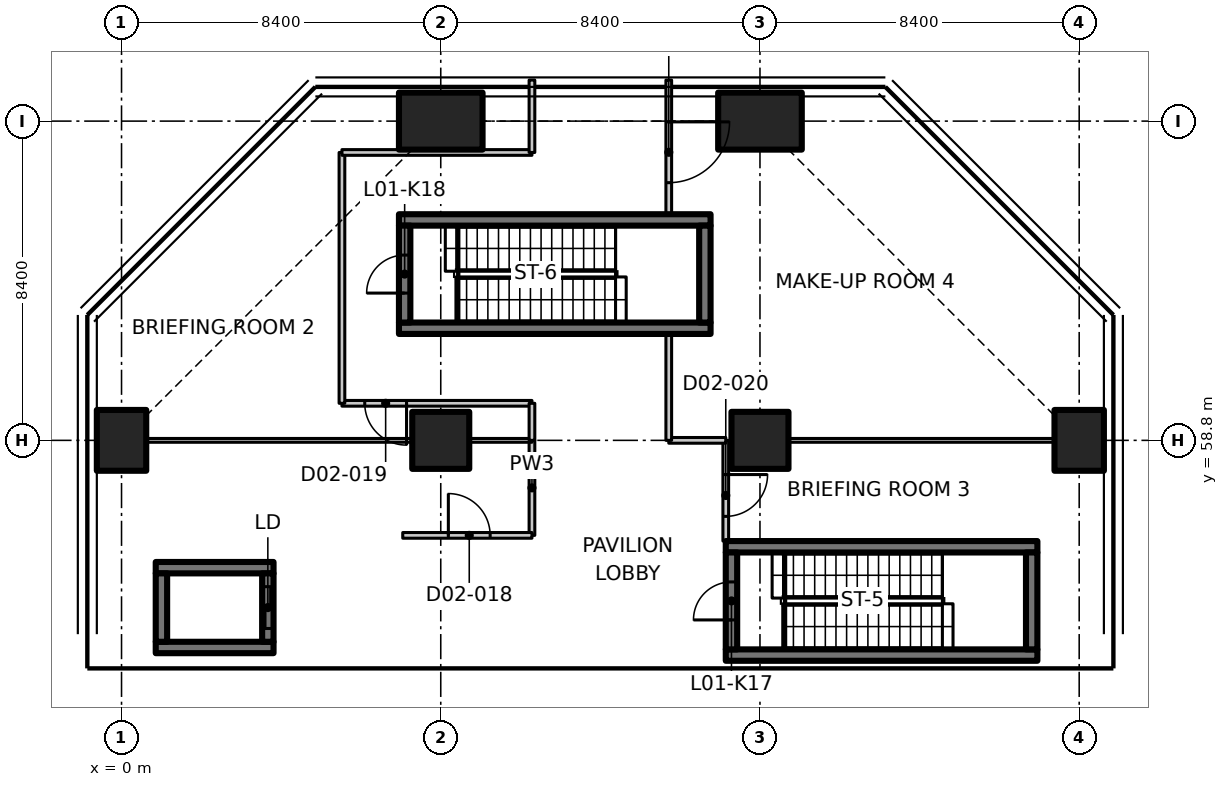
"""IFC4 building model, lengths in metres.
Left out: names, types, materials, properties, quantities, classifications, styles, units other than length and angle.
Written with IfcOpenShell. Run it as: python <this file> out.ifc"""

import sys

from ifc_helpers import new_model, si_unit, direction, frame, frame_2d, origin, origin_2d, place, context, subcontext, project, spatial, polyline, rectangle, outline, extrude, element, fill, save


model = new_model("IFC4")
c1 = context("Model", 3, precision=1e-05, world=origin(), true_north=direction((0.0, 1.0)))
c2 = subcontext(c1, "Body", "Model", "MODEL_VIEW")
j1 = project(units=[si_unit("LENGTHUNIT", "METRE"), si_unit("PLANEANGLEUNIT", "RADIAN")], contexts=[c1])
p1 = place(None, origin())
s1 = spatial("IfcSite", under=j1, at=p1, CompositionType="ELEMENT")
p2 = place(p1, origin())
s2 = spatial("IfcBuilding", under=s1, at=p2, CompositionType="ELEMENT")
p3 = place(p2, frame((0.0, 0.0, 7.0)))
s3 = spatial("IfcBuildingStorey", under=s2, at=p3, CompositionType="ELEMENT", Elevation=7.0)
p4 = place(p3, frame((0.0, 58.8, 0.0), z_axis=(0.0, 0.0, 1.0), x_axis=(1.0, 0.0, 0.0)))
e1 = element("IfcColumn", 1, at=p4, inside=s3, PredefinedType="COLUMN", context=c2, shape_type="SweptSolid", body=[
    extrude(rectangle(XDim=1.3, YDim=1.6, at=origin_2d()), origin(), (0.0, 0.0, 1.0), 5.25),
])
p5 = place(p3, frame((8.4, 58.8, 0.0), z_axis=(0.0, 0.0, 1.0), x_axis=(1.0, 0.0, 0.0)))
e2 = element("IfcColumn", 2, at=p5, inside=s3, PredefinedType="COLUMN", context=c2, shape_type="SweptSolid", body=[
    extrude(rectangle(XDim=1.5, YDim=1.5, at=origin_2d()), origin(), (0.0, 0.0, 1.0), 5.25),
])
p6 = place(p3, frame((8.4, 67.2, 0.0), z_axis=(0.0, 0.0, 1.0), x_axis=(0.0, 1.0, 0.0)))
e3 = element("IfcColumn", 3, at=p6, inside=s3, PredefinedType="COLUMN", context=c2, shape_type="SweptSolid", body=[
    extrude(rectangle(XDim=1.5, YDim=2.2, at=origin_2d()), origin(), (0.0, 0.0, 1.0), 5.25),
])
p7 = place(p3, frame((16.8, 58.8, 0.0), z_axis=(0.0, 0.0, 1.0), x_axis=(1.0, 0.0, 0.0)))
e4 = element("IfcColumn", 4, at=p7, inside=s3, PredefinedType="COLUMN", context=c2, shape_type="SweptSolid", body=[
    extrude(rectangle(XDim=1.5, YDim=1.5, at=origin_2d()), origin(), (0.0, 0.0, 1.0), 5.25),
])
p8 = place(p3, frame((16.8, 67.2, 0.0), z_axis=(0.0, 0.0, 1.0), x_axis=(0.0, 1.0, 0.0)))
e5 = element("IfcColumn", 5, at=p8, inside=s3, PredefinedType="COLUMN", context=c2, shape_type="SweptSolid", body=[
    extrude(rectangle(XDim=1.5, YDim=2.2, at=origin_2d()), origin(), (0.0, 0.0, 1.0), 5.25),
])
p9 = place(p3, frame((25.2, 58.8, 0.0), z_axis=(0.0, 0.0, 1.0), x_axis=(1.0, 0.0, 0.0)))
e6 = element("IfcColumn", 6, at=p9, inside=s3, PredefinedType="COLUMN", context=c2, shape_type="SweptSolid", body=[
    extrude(rectangle(XDim=1.3, YDim=1.6, at=origin_2d()), origin(), (0.0, 0.0, 1.0), 5.25),
])
p10 = place(p2, origin())
s4 = spatial("IfcBuildingStorey", under=s2, at=p10, CompositionType="ELEMENT", Elevation=0.0)
for number, where, z_axis, x_axis in (
    (7, (0.6, 51.6, -6.3), (0.0, 0.0, 1.0), (1.0, 0.0, 0.0)),
    (8, (9.0, 51.6, -6.3), (0.0, 0.0, 1.0), (1.0, 0.0, 0.0)),
):
    element("IfcWall", number, at=place(p10, frame(where, z_axis=z_axis, x_axis=x_axis)), inside=s4, PredefinedType="SOLIDWALL", context=c2, shape_type="SweptSolid", body=[
        extrude(rectangle(XDim=7.2, YDim=2.4, at=frame_2d((3.6, 0.0))), origin(), (0.0, 0.0, 1.0), 42.55),
    ])
p11 = place(p10, frame((17.4, 51.6, -6.3), z_axis=(0.0, 0.0, 1.0), x_axis=(1.0, 0.0, 0.0)))
e9 = element("IfcWall", 9, at=p11, inside=s4, PredefinedType="SOLIDWALL", context=c2, shape_type="SweptSolid", body=[
    extrude(rectangle(XDim=7.2, YDim=2.4, at=frame_2d((3.6, 0.0))), origin(), (0.0, 0.0, 1.0), 42.55),
])
for number, where, z_axis, x_axis in (
    (10, (-1.2, 52.8, 0.0), (0.0, 0.0, 1.0), (0.0, 1.0, 0.0)),
    (11, (26.4, 52.8, 0.0), (0.0, 0.0, 1.0), (0.0, 1.0, 0.0)),
):
    element("IfcWall", number, at=place(p10, frame(where, z_axis=z_axis, x_axis=x_axis)), inside=s4, PredefinedType="SOLIDWALL", context=c2, shape_type="SweptSolid", body=[
        extrude(rectangle(XDim=0.9, YDim=0.6, at=frame_2d((0.45, 0.0))), origin(), (0.0, 0.0, 1.0), 36.23),
    ])
for number, where, z_axis, x_axis in (
    (12, (0.9, 53.35, 0.0), (0.0, 0.0, 1.0), (1.0, 0.0, 0.0)),
    (13, (0.9, 55.45, 0.0), (0.0, 0.0, 1.0), (1.0, 0.0, 0.0)),
):
    element("IfcWall", number, at=place(p3, frame(where, z_axis=z_axis, x_axis=x_axis)), inside=s3, PredefinedType="SHEAR", context=c2, shape_type="SweptSolid", body=[
        extrude(rectangle(XDim=3.1, YDim=0.3, at=frame_2d((1.55, 0.0))), origin(), (0.0, 0.0, 1.0), 5.25),
    ])
p12 = place(p3, frame((1.05, 53.5, 0.0), z_axis=(0.0, 0.0, 1.0), x_axis=(0.0, 1.0, 0.0)))
e14 = element("IfcWall", 14, at=p12, inside=s3, PredefinedType="SHEAR", context=c2, shape_type="SweptSolid", body=[
    extrude(rectangle(XDim=1.8, YDim=0.3, at=frame_2d((0.9, 0.0))), origin(), (0.0, 0.0, 1.0), 5.25),
])
p13 = place(p3, frame((3.85, 53.5, 0.0), z_axis=(0.0, 0.0, 1.0), x_axis=(0.0, 1.0, 0.0)))
e15 = element("IfcWall", 15, at=p13, inside=s3, PredefinedType="SHEAR", context=c2, shape_type="SweptSolid", body=[
    extrude(rectangle(XDim=1.8, YDim=0.3, at=frame_2d((0.9, 0.0))), origin(), (0.0, 0.0, 1.0), 5.25),
])
p14 = place(p13, frame((0.35, 0.0, 0.0)))
e16 = element("IfcOpeningElement", 16, at=p14, cuts=e15, PredefinedType="OPENING", context=c2, shape_type="SweptSolid", body=[
    extrude(rectangle(XDim=1.1, YDim=2.3, at=frame_2d((0.55, 1.15))), frame((0.0, 0.16, 0.0), z_axis=(0.0, -1.0, 0.0), x_axis=(1.0, 0.0, 0.0)), (0.0, 0.0, 1.0), 0.32),
])
for number, where, z_axis, x_axis in (
    (17, (15.9, 53.15, 0.0), (0.0, 0.0, 1.0), (1.0, 0.0, 0.0)),
    (18, (15.9, 56.0, 0.0), (0.0, 0.0, 1.0), (1.0, 0.0, 0.0)),
):
    element("IfcWall", number, at=place(p3, frame(where, z_axis=z_axis, x_axis=x_axis)), inside=s3, PredefinedType="SHEAR", context=c2, shape_type="SweptSolid", body=[
        extrude(rectangle(XDim=8.2, YDim=0.3, at=frame_2d((4.1, 0.0))), origin(), (0.0, 0.0, 1.0), 5.25),
    ])
p15 = place(p3, frame((16.05, 53.3, 0.0), z_axis=(0.0, 0.0, 1.0), x_axis=(0.0, 1.0, 0.0)))
e19 = element("IfcWall", 19, at=p15, inside=s3, PredefinedType="SHEAR", context=c2, shape_type="SweptSolid", body=[
    extrude(rectangle(XDim=2.55, YDim=0.3, at=frame_2d((1.275, 0.0))), origin(), (0.0, 0.0, 1.0), 5.25),
])
p16 = place(p15, frame((0.775, 0.0, 0.0)))
e20 = element("IfcOpeningElement", 20, at=p16, cuts=e19, PredefinedType="OPENING", context=c2, shape_type="SweptSolid", body=[
    extrude(rectangle(XDim=1.0, YDim=2.1, at=frame_2d((0.5, 1.05))), frame((0.0, 0.16, 0.0), z_axis=(0.0, -1.0, 0.0), x_axis=(1.0, 0.0, 0.0)), (0.0, 0.0, 1.0), 0.32),
])
p17 = place(p3, frame((23.95, 53.3, 0.0), z_axis=(0.0, 0.0, 1.0), x_axis=(0.0, 1.0, 0.0)))
e21 = element("IfcWall", 21, at=p17, inside=s3, PredefinedType="SHEAR", context=c2, shape_type="SweptSolid", body=[
    extrude(rectangle(XDim=2.55, YDim=0.3, at=frame_2d((1.275, 0.0))), origin(), (0.0, 0.0, 1.0), 5.25),
])
for number, where, z_axis, x_axis in (
    (22, (7.3, 61.75, 0.0), (0.0, 0.0, 1.0), (1.0, 0.0, 0.0)),
    (23, (7.3, 64.6, 0.0), (0.0, 0.0, 1.0), (1.0, 0.0, 0.0)),
):
    element("IfcWall", number, at=place(p3, frame(where, z_axis=z_axis, x_axis=x_axis)), inside=s3, PredefinedType="SHEAR", context=c2, shape_type="SweptSolid", body=[
        extrude(rectangle(XDim=8.2, YDim=0.3, at=frame_2d((4.1, 0.0))), origin(), (0.0, 0.0, 1.0), 5.25),
    ])
p18 = place(p3, frame((7.45, 61.9, 0.0), z_axis=(0.0, 0.0, 1.0), x_axis=(0.0, 1.0, 0.0)))
e24 = element("IfcWall", 24, at=p18, inside=s3, PredefinedType="SHEAR", context=c2, shape_type="SweptSolid", body=[
    extrude(rectangle(XDim=2.55, YDim=0.3, at=frame_2d((1.275, 0.0))), origin(), (0.0, 0.0, 1.0), 5.25),
])
p19 = place(p18, frame((0.775, 0.0, 0.0)))
e25 = element("IfcOpeningElement", 25, at=p19, cuts=e24, PredefinedType="OPENING", context=c2, shape_type="SweptSolid", body=[
    extrude(rectangle(XDim=1.0, YDim=2.1, at=frame_2d((0.5, 1.05))), frame((0.0, 0.16, 0.0), z_axis=(0.0, -1.0, 0.0), x_axis=(1.0, 0.0, 0.0)), (0.0, 0.0, 1.0), 0.32),
])
p20 = place(p3, frame((15.35, 61.9, 0.0), z_axis=(0.0, 0.0, 1.0), x_axis=(0.0, 1.0, 0.0)))
e26 = element("IfcWall", 26, at=p20, inside=s3, PredefinedType="SHEAR", context=c2, shape_type="SweptSolid", body=[
    extrude(rectangle(XDim=2.55, YDim=0.3, at=frame_2d((1.275, 0.0))), origin(), (0.0, 0.0, 1.0), 5.25),
])
p21 = place(p3, frame((10.8, 56.3, 0.0), z_axis=(0.0, 0.0, 1.0), x_axis=(0.0, 1.0, 0.0)))
e27 = element("IfcWall", 27, at=p21, inside=s3, PredefinedType="PARTITIONING", context=c2, shape_type="SweptSolid", body=[
    extrude(rectangle(XDim=2.5, YDim=0.15, at=frame_2d((1.25, 0.0))), origin(), (0.0, 0.0, 1.0), 5.23),
])
p22 = place(p3, frame((15.9, 58.8, 0.0), z_axis=(0.0, 0.0, 1.0), x_axis=(0.0, -1.0, 0.0)))
e28 = element("IfcWall", 28, at=p22, inside=s3, PredefinedType="PARTITIONING", context=c2, shape_type="SweptSolid", body=[
    extrude(rectangle(XDim=2.65, YDim=0.15, at=frame_2d((1.325, 0.0))), origin(), (0.0, 0.0, 1.0), 5.23),
])
p23 = place(p22, frame((0.9, 0.0, 0.0)))
e29 = element("IfcOpeningElement", 29, at=p23, cuts=e28, PredefinedType="OPENING", context=c2, shape_type="SweptSolid", body=[
    extrude(rectangle(XDim=1.1, YDim=2.1, at=frame_2d((0.55, 1.05))), frame((0.0, 0.085, 0.0), z_axis=(0.0, -1.0, 0.0), x_axis=(1.0, 0.0, 0.0)), (0.0, 0.0, 1.0), 0.17),
])
p24 = place(p3, frame((14.4, 58.8, 0.0), z_axis=(0.0, 0.0, 1.0), x_axis=(1.0, 0.0, 0.0)))
e30 = element("IfcWall", 30, at=p24, inside=s3, PredefinedType="PARTITIONING", context=c2, shape_type="SweptSolid", body=[
    extrude(rectangle(XDim=1.5, YDim=0.15, at=frame_2d((0.75, 0.0))), origin(), (0.0, 0.0, 1.0), 5.23),
])
p25 = place(p3, frame((10.8, 59.775, 0.0), z_axis=(0.0, 0.0, 1.0), x_axis=(-1.0, 0.0, 0.0)))
e31 = element("IfcWall", 31, at=p25, inside=s3, PredefinedType="PARTITIONING", context=c2, shape_type="SweptSolid", body=[
    extrude(rectangle(XDim=5.0, YDim=0.15, at=frame_2d((2.5, 0.0))), origin(), (0.0, 0.0, 1.0), 5.23),
])
p26 = place(p25, frame((3.3, 0.0, 0.0)))
e32 = element("IfcOpeningElement", 32, at=p26, cuts=e31, PredefinedType="OPENING", context=c2, shape_type="SweptSolid", body=[
    extrude(rectangle(XDim=1.1, YDim=2.1, at=frame_2d((0.55, 1.05))), frame((0.0, 0.085, 0.0), z_axis=(0.0, -1.0, 0.0), x_axis=(1.0, 0.0, 0.0)), (0.0, 0.0, 1.0), 0.17),
])
p27 = place(p3, frame((5.8, 59.775, 0.0), z_axis=(0.0, 0.0, 1.0), x_axis=(0.0, 1.0, 0.0)))
e33 = element("IfcWall", 33, at=p27, inside=s3, PredefinedType="PARTITIONING", context=c2, shape_type="SweptSolid", body=[
    extrude(outline(polyline([(0.0, 0.0), (6.6, 0.0), (6.6, 5.23), (5.516, 5.23), (5.514, 4.88), (4.136, 4.88), (4.134, 5.23), (0.0, 5.23), (0.0, 0.0)])), frame((0.0, 0.075, 0.0), z_axis=(0.0, -1.0, 0.0), x_axis=(1.0, 0.0, 0.0)), (0.0, 0.0, 1.0), 0.15),
])
p28 = place(p3, frame((5.8, 66.375, 0.0), z_axis=(0.0, 0.0, 1.0), x_axis=(1.0, 0.0, 0.0)))
e34 = element("IfcWall", 34, at=p28, inside=s3, PredefinedType="PARTITIONING", context=c2, shape_type="SweptSolid", body=[
    extrude(outline(polyline([(0.0, 0.0), (5.0, 0.0), (5.0, 5.23), (2.466, 5.23), (2.464, 4.88), (1.086, 4.88), (1.084, 5.23), (0.0, 5.23), (0.0, 0.0)])), frame((0.0, 0.075, 0.0), z_axis=(0.0, -1.0, 0.0), x_axis=(1.0, 0.0, 0.0)), (0.0, 0.0, 1.0), 0.15),
])
p29 = place(p3, frame((7.4, 56.3, 0.0), z_axis=(0.0, 0.0, 1.0), x_axis=(1.0, 0.0, 0.0)))
e35 = element("IfcWall", 35, at=p29, inside=s3, PredefinedType="PARTITIONING", context=c2, shape_type="SweptSolid", body=[
    extrude(rectangle(XDim=3.4, YDim=0.15, at=frame_2d((1.7, 0.0))), origin(), (0.0, 0.0, 1.0), 5.23),
])
p30 = place(p29, frame((1.2, 0.0, 0.0)))
e36 = element("IfcOpeningElement", 36, at=p30, cuts=e35, PredefinedType="OPENING", context=c2, shape_type="SweptSolid", body=[
    extrude(rectangle(XDim=1.1, YDim=2.1, at=frame_2d((0.55, 1.05))), frame((0.0, 0.085, 0.0), z_axis=(0.0, -1.0, 0.0), x_axis=(1.0, 0.0, 0.0)), (0.0, 0.0, 1.0), 0.17),
])
p31 = place(p3, frame((10.8, 66.375, 0.0), z_axis=(0.0, 0.0, 1.0), x_axis=(0.0, 1.0, 0.0)))
e37 = element("IfcWall", 37, at=p31, inside=s3, PredefinedType="PARTITIONING", context=c2, shape_type="SweptSolid", body=[
    extrude(rectangle(XDim=1.905, YDim=0.15, at=frame_2d((0.953, 0.0))), origin(), (0.0, 0.0, 1.0), 4.88),
])
p32 = place(p3, frame((14.4, 68.28, 0.0), z_axis=(0.0, 0.0, 1.0), x_axis=(0.0, -1.0, 0.0)))
e38 = element("IfcWall", 38, at=p32, inside=s3, PredefinedType="PARTITIONING", context=c2, shape_type="SweptSolid", body=[
    extrude(rectangle(XDim=3.53, YDim=0.15, at=frame_2d((1.765, 0.0))), origin(), (0.0, 0.0, 1.0), 4.88),
])
p33 = place(p32, frame((1.1, 0.0, 0.0)))
e39 = element("IfcOpeningElement", 39, at=p33, cuts=e38, PredefinedType="OPENING", context=c2, shape_type="SweptSolid", body=[
    extrude(rectangle(XDim=1.6, YDim=2.1, at=frame_2d((0.8, 1.05))), frame((0.0, 0.085, 0.0), z_axis=(0.0, -1.0, 0.0), x_axis=(1.0, 0.0, 0.0)), (0.0, 0.0, 1.0), 0.17),
])
p34 = place(p3, frame((0.67, 58.8, 0.0), z_axis=(0.0, 0.0, 1.0), x_axis=(1.0, 0.0, 0.0)))
e40 = element("IfcWall", 40, at=p34, inside=s3, PredefinedType="PARTITIONING", context=c2, shape_type="SweptSolid", body=[
    extrude(rectangle(XDim=6.96, YDim=0.1, at=frame_2d((3.48, 0.0))), origin(), (0.0, 0.0, 1.0), 5.23),
])
p35 = place(p3, frame((9.17, 58.8, 0.0), z_axis=(0.0, 0.0, 1.0), x_axis=(1.0, 0.0, 0.0)))
e41 = element("IfcWall", 41, at=p35, inside=s3, PredefinedType="PARTITIONING", context=c2, shape_type="SweptSolid", body=[
    extrude(rectangle(XDim=1.63, YDim=0.1, at=frame_2d((0.815, 0.0))), origin(), (0.0, 0.0, 1.0), 5.23),
])
p36 = place(p3, frame((10.8, 59.775, 0.0), z_axis=(0.0, 0.0, 1.0), x_axis=(0.0, -1.0, 0.0)))
e42 = element("IfcWall", 42, at=p36, inside=s3, PredefinedType="PARTITIONING", context=c2, shape_type="SweptSolid", body=[
    extrude(rectangle(XDim=0.975, YDim=0.15, at=frame_2d((0.487, 0.0))), origin(), (0.0, 0.0, 1.0), 5.23),
])
p37 = place(p3, frame((17.57, 58.8, 0.0), z_axis=(0.0, 0.0, 1.0), x_axis=(1.0, 0.0, 0.0)))
e43 = element("IfcWall", 43, at=p37, inside=s3, PredefinedType="PARTITIONING", context=c2, shape_type="SweptSolid", body=[
    extrude(rectangle(XDim=6.96, YDim=0.1, at=frame_2d((3.48, 0.0))), origin(), (0.0, 0.0, 1.0), 5.23),
])
p38 = place(p3, frame((14.4, 58.8, 0.0), z_axis=(0.0, 0.0, 1.0), x_axis=(0.0, 1.0, 0.0)))
e44 = element("IfcWall", 44, at=p38, inside=s3, PredefinedType="PARTITIONING", context=c2, shape_type="SweptSolid", body=[
    extrude(rectangle(XDim=2.8, YDim=0.15, at=frame_2d((1.4, 0.0))), origin(), (0.0, 0.0, 1.0), 5.23),
])
p39 = place(p14, origin())
e45 = element("IfcDoor", 45, at=p39, inside=s3, OperationType="SLIDING_TO_LEFT", PredefinedType="DOOR", context=c2, shape_type="SweptSolid", body=[
    extrude(rectangle(XDim=1.1, YDim=2.3, at=frame_2d((0.55, 1.15))), frame((0.0, 0.025, 0.0), z_axis=(0.0, -1.0, 0.0), x_axis=(1.0, 0.0, 0.0)), (0.0, 0.0, 1.0), 0.05),
])
fill(e16, e45)
p40 = place(p16, origin())
e46 = element("IfcDoor", 46, at=p40, inside=s3, OperationType="SINGLE_SWING_LEFT", PredefinedType="DOOR", context=c2, shape_type="SweptSolid", body=[
    extrude(rectangle(XDim=1.0, YDim=2.1, at=frame_2d((0.5, 1.05))), frame((0.0, 0.025, 0.0), z_axis=(0.0, -1.0, 0.0), x_axis=(1.0, 0.0, 0.0)), (0.0, 0.0, 1.0), 0.05),
])
fill(e20, e46)
p41 = place(p19, origin())
e47 = element("IfcDoor", 47, at=p41, inside=s3, OperationType="SINGLE_SWING_RIGHT", PredefinedType="DOOR", context=c2, shape_type="SweptSolid", body=[
    extrude(rectangle(XDim=1.0, YDim=2.1, at=frame_2d((0.5, 1.05))), frame((0.0, 0.025, 0.0), z_axis=(0.0, -1.0, 0.0), x_axis=(1.0, 0.0, 0.0)), (0.0, 0.0, 1.0), 0.05),
])
fill(e25, e47)
p42 = place(p30, origin())
e48 = element("IfcDoor", 48, at=p42, inside=s3, OperationType="SINGLE_SWING_LEFT", PredefinedType="DOOR", context=c2, shape_type="SweptSolid", body=[
    extrude(rectangle(XDim=1.1, YDim=2.1, at=frame_2d((0.55, 1.05))), frame((0.0, 0.025, 0.0), z_axis=(0.0, -1.0, 0.0), x_axis=(1.0, 0.0, 0.0)), (0.0, 0.0, 1.0), 0.05),
])
fill(e36, e48)
p43 = place(p26, origin())
e49 = element("IfcDoor", 49, at=p43, inside=s3, OperationType="SINGLE_SWING_LEFT", PredefinedType="DOOR", context=c2, shape_type="SweptSolid", body=[
    extrude(rectangle(XDim=1.1, YDim=2.1, at=frame_2d((0.55, 1.05))), frame((0.0, 0.025, 0.0), z_axis=(0.0, -1.0, 0.0), x_axis=(1.0, 0.0, 0.0)), (0.0, 0.0, 1.0), 0.05),
])
fill(e32, e49)
p44 = place(p23, origin())
e50 = element("IfcDoor", 50, at=p44, inside=s3, OperationType="SINGLE_SWING_LEFT", PredefinedType="DOOR", context=c2, shape_type="SweptSolid", body=[
    extrude(rectangle(XDim=1.1, YDim=2.1, at=frame_2d((0.55, 1.05))), frame((0.0, 0.025, 0.0), z_axis=(0.0, -1.0, 0.0), x_axis=(1.0, 0.0, 0.0)), (0.0, 0.0, 1.0), 0.05),
])
fill(e29, e50)
p45 = place(p33, origin())
e51 = element("IfcDoor", 51, at=p45, inside=s3, OperationType="DOUBLE_DOOR_SINGLE_SWING", PredefinedType="DOOR", context=c2, shape_type="SweptSolid", body=[
    extrude(rectangle(XDim=1.6, YDim=2.1, at=frame_2d((0.8, 1.05))), frame((0.0, 0.025, 0.0), z_axis=(0.0, -1.0, 0.0), x_axis=(1.0, 0.0, 0.0)), (0.0, 0.0, 1.0), 0.05),
])
fill(e39, e51)
save(model, sys.argv[1])
